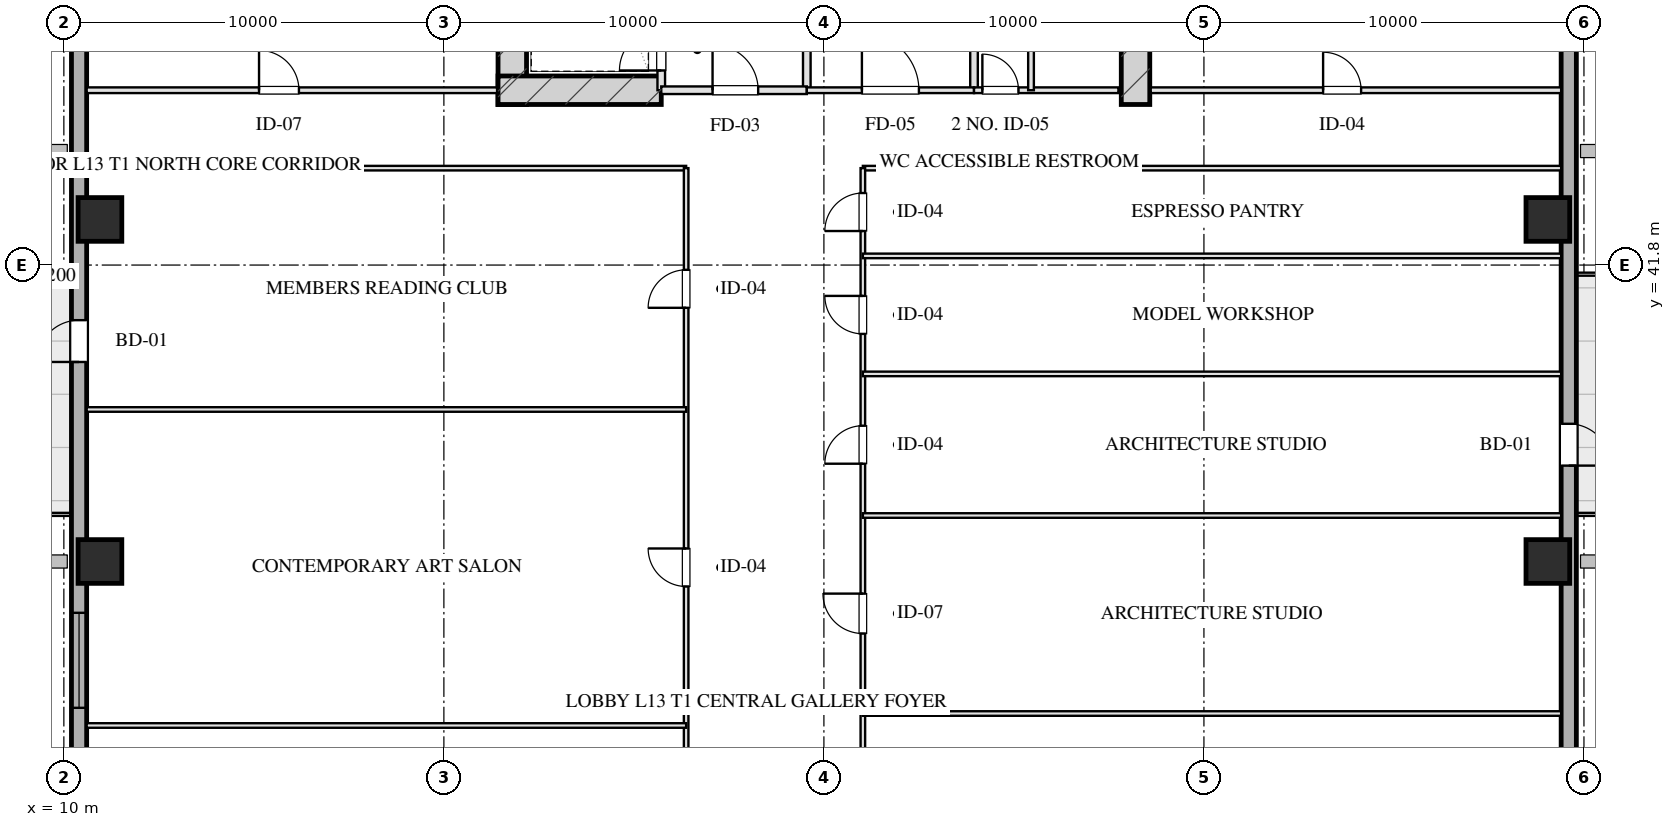
"""IFC4 building model, lengths in metres.
Left out: names, types, materials, properties, quantities, classifications, styles, units other than length and angle.
Written with IfcOpenShell. Run it as: python <this file> out.ifc"""

import sys

from ifc_helpers import new_model, si_unit, direction, frame, frame_2d, origin, origin_2d, place, context, subcontext, project, spatial, rectangle, hollow_rectangle, extrude, element, fill, save


model = new_model("IFC4")
c1 = context("Model", 3, precision=1e-05, world=origin(), true_north=direction((0.0, 1.0)))
c2 = subcontext(c1, "Body", "Model", "MODEL_VIEW")
j1 = project(units=[si_unit("LENGTHUNIT", "METRE"), si_unit("PLANEANGLEUNIT", "RADIAN")], contexts=[c1])
p1 = place(None, origin())
s1 = spatial("IfcSite", under=j1, at=p1, CompositionType="ELEMENT")
p2 = place(p1, origin())
s2 = spatial("IfcBuilding", under=s1, at=p2, CompositionType="ELEMENT")
p3 = place(p2, frame((0.0, 0.0, 57.5)))
s3 = spatial("IfcBuildingStorey", under=s2, at=p3, CompositionType="ELEMENT", Elevation=57.5)
for number, where, z_axis, x_axis in (
    (1, (21.8, 46.025, 0.0), (0.0, 0.0, 1.0), (0.0, 1.0, 0.0)),
    (2, (38.2, 46.025, 0.0), (0.0, 0.0, 1.0), (0.0, 1.0, 0.0)),
):
    element("IfcWall", number, at=place(p3, frame(where, z_axis=z_axis, x_axis=x_axis)), inside=s3, PredefinedType="SHEAR", context=c2, shape_type="SweptSolid", body=[
        extrude(rectangle(XDim=9.63, YDim=0.75, at=frame_2d((4.815, 0.0))), origin(), (0.0, 0.0, 1.0), 3.45),
    ])
p4 = place(p3, frame((21.425, 46.4, 0.0), z_axis=(0.0, 0.0, 1.0), x_axis=(1.0, 0.0, 0.0)))
e3 = element("IfcWall", 3, at=p4, inside=s3, PredefinedType="SHEAR", context=c2, shape_type="SweptSolid", body=[
    extrude(rectangle(XDim=4.295, YDim=0.75, at=frame_2d((2.147, 0.0))), origin(), (0.0, 0.0, 1.0), 3.45),
])
for number, where, z_axis, x_axis in (
    (4, (10.95, 34.0, 0.0), (0.0, 0.0, 1.0), (1.0, 0.0, 0.0)),
    (5, (10.95, 43.0, 0.0), (0.0, 0.0, 1.0), (1.0, 0.0, 0.0)),
    (6, (49.05, 34.0, 0.0), (0.0, 0.0, 1.0), (1.0, 0.0, 0.0)),
    (7, (49.05, 43.0, 0.0), (0.0, 0.0, 1.0), (1.0, 0.0, 0.0)),
):
    element("IfcColumn", number, at=place(p3, frame(where, z_axis=z_axis, x_axis=x_axis)), inside=s3, PredefinedType="COLUMN", context=c2, shape_type="SweptSolid", body=[
        extrude(hollow_rectangle(XDim=1.15, YDim=1.15, WallThickness=0.04, at=origin_2d()), origin(), (0.0, 0.0, 1.0), 3.451),
    ])
p5 = place(p3, frame((10.4, 7.2, 0.0), z_axis=(0.0, 0.0, 1.0), x_axis=(0.0, 1.0, 0.0)))
e8 = element("IfcWall", 8, at=p5, inside=s3, PredefinedType="SOLIDWALL", context=c2, shape_type="SweptSolid", body=[
    extrude(rectangle(XDim=53.6, YDim=0.4, at=frame_2d((26.8, 0.0))), origin(), (0.0, 0.0, 1.0), 2.61),
])
p6 = place(p5, frame((19.15, 0.0, 0.75)))
e9 = element("IfcOpeningElement", 9, at=p6, cuts=e8, PredefinedType="OPENING", context=c2, shape_type="SweptSolid", body=[
    extrude(rectangle(XDim=2.5, YDim=1.46, at=frame_2d((1.25, 0.73))), frame((0.0, 0.21, 0.0), z_axis=(0.0, -1.0, 0.0), x_axis=(1.0, 0.0, 0.0)), (0.0, 0.0, 1.0), 0.42),
])
p7 = place(p5, frame((22.95, 0.0, 0.75)))
e10 = element("IfcOpeningElement", 10, at=p7, cuts=e8, PredefinedType="OPENING", context=c2, shape_type="SweptSolid", body=[
    extrude(rectangle(XDim=2.5, YDim=1.46, at=frame_2d((1.25, 0.73))), frame((0.0, 0.21, 0.0), z_axis=(0.0, -1.0, 0.0), x_axis=(1.0, 0.0, 0.0)), (0.0, 0.0, 1.0), 0.42),
])
p8 = place(p5, frame((32.05, 0.0, 0.0)))
e11 = element("IfcOpeningElement", 11, at=p8, cuts=e8, PredefinedType="OPENING", context=c2, shape_type="SweptSolid", body=[
    extrude(rectangle(XDim=1.1, YDim=2.15, at=frame_2d((0.55, 1.075))), frame((0.0, 0.21, 0.0), z_axis=(0.0, -1.0, 0.0), x_axis=(1.0, 0.0, 0.0)), (0.0, 0.0, 1.0), 0.42),
])
p9 = place(p3, frame((49.6, 60.8, 0.0), z_axis=(0.0, 0.0, 1.0), x_axis=(0.0, -1.0, 0.0)))
e12 = element("IfcWall", 12, at=p9, inside=s3, PredefinedType="SOLIDWALL", context=c2, shape_type="SweptSolid", body=[
    extrude(rectangle(XDim=53.6, YDim=0.4, at=frame_2d((26.8, 0.0))), origin(), (0.0, 0.0, 1.0), 2.61),
])
p10 = place(p9, frame((23.177, 0.0, 0.0)))
e13 = element("IfcOpeningElement", 13, at=p10, cuts=e12, PredefinedType="OPENING", context=c2, shape_type="SweptSolid", body=[
    extrude(rectangle(XDim=1.1, YDim=2.15, at=frame_2d((0.55, 1.075))), frame((0.0, 0.21, 0.0), z_axis=(0.0, -1.0, 0.0), x_axis=(1.0, 0.0, 0.0)), (0.0, 0.0, 1.0), 0.42),
])
p11 = place(p3, frame((25.72, 46.4, 0.0), z_axis=(0.0, 0.0, 1.0), x_axis=(0.0, 1.0, 0.0)))
e14 = element("IfcWall", 14, at=p11, inside=s3, PredefinedType="PARTITIONING", context=c2, shape_type="SweptSolid", body=[
    extrude(rectangle(XDim=1.9, YDim=0.2, at=frame_2d((0.95, 0.0))), origin(), (0.0, 0.0, 1.0), 3.175),
])
p12 = place(p11, frame((0.52, 0.0, 0.0)))
e15 = element("IfcOpeningElement", 15, at=p12, cuts=e14, PredefinedType="OPENING", context=c2, shape_type="SweptSolid", body=[
    extrude(rectangle(XDim=1.1, YDim=2.05, at=frame_2d((0.55, 1.025))), frame((0.0, 0.11, 0.0), z_axis=(0.0, -1.0, 0.0), x_axis=(1.0, 0.0, 0.0)), (0.0, 0.0, 1.0), 0.22),
])
p13 = place(p3, frame((29.55, 46.4, 0.0), z_axis=(0.0, 0.0, 1.0), x_axis=(0.0, 1.0, 0.0)))
e16 = element("IfcWall", 16, at=p13, inside=s3, PredefinedType="PARTITIONING", context=c2, shape_type="SweptSolid", body=[
    extrude(rectangle(XDim=8.43, YDim=0.2, at=frame_2d((4.215, 0.0))), origin(), (0.0, 0.0, 1.0), 3.175),
])
p14 = place(p3, frame((25.72, 46.4, 0.0), z_axis=(0.0, 0.0, 1.0), x_axis=(1.0, 0.0, 0.0)))
e17 = element("IfcWall", 17, at=p14, inside=s3, PredefinedType="PARTITIONING", context=c2, shape_type="SweptSolid", body=[
    extrude(rectangle(XDim=3.83, YDim=0.2, at=frame_2d((1.915, 0.0))), origin(), (0.0, 0.0, 1.0), 3.175),
])
p15 = place(p14, frame((1.35, 0.0, 0.0)))
e18 = element("IfcOpeningElement", 18, at=p15, cuts=e17, PredefinedType="OPENING", context=c2, shape_type="SweptSolid", body=[
    extrude(rectangle(XDim=1.2, YDim=2.05, at=frame_2d((0.6, 1.025))), frame((0.0, 0.11, 0.0), z_axis=(0.0, -1.0, 0.0), x_axis=(1.0, 0.0, 0.0)), (0.0, 0.0, 1.0), 0.22),
])
p16 = place(p3, frame((33.95, 46.4, 0.0), z_axis=(0.0, 0.0, 1.0), x_axis=(0.0, 1.0, 0.0)))
e19 = element("IfcWall", 19, at=p16, inside=s3, PredefinedType="PARTITIONING", context=c2, shape_type="SweptSolid", body=[
    extrude(rectangle(XDim=8.43, YDim=0.2, at=frame_2d((4.215, 0.0))), origin(), (0.0, 0.0, 1.0), 3.175),
])
p17 = place(p3, frame((29.55, 46.4, 0.0), z_axis=(0.0, 0.0, 1.0), x_axis=(1.0, 0.0, 0.0)))
e20 = element("IfcWall", 20, at=p17, inside=s3, PredefinedType="PARTITIONING", context=c2, shape_type="SweptSolid", body=[
    extrude(rectangle(XDim=4.4, YDim=0.15, at=frame_2d((2.2, 0.0))), origin(), (0.0, 0.0, 1.0), 3.175),
])
p18 = place(p17, frame((1.45, 0.0, 0.0)))
e21 = element("IfcOpeningElement", 21, at=p18, cuts=e20, PredefinedType="OPENING", context=c2, shape_type="SweptSolid", body=[
    extrude(rectangle(XDim=1.5, YDim=2.05, at=frame_2d((0.75, 1.025))), frame((0.0, 0.085, 0.0), z_axis=(0.0, -1.0, 0.0), x_axis=(1.0, 0.0, 0.0)), (0.0, 0.0, 1.0), 0.17),
])
p19 = place(p3, frame((33.95, 46.4, 0.0), z_axis=(0.0, 0.0, 1.0), x_axis=(1.0, 0.0, 0.0)))
e22 = element("IfcWall", 22, at=p19, inside=s3, PredefinedType="PARTITIONING", context=c2, shape_type="SweptSolid", body=[
    extrude(rectangle(XDim=3.8, YDim=0.15, at=frame_2d((1.9, 0.0))), origin(), (0.0, 0.0, 1.0), 3.175),
])
p20 = place(p19, frame((0.22, 0.0, 0.0)))
e23 = element("IfcOpeningElement", 23, at=p20, cuts=e22, PredefinedType="OPENING", context=c2, shape_type="SweptSolid", body=[
    extrude(rectangle(XDim=0.95, YDim=2.05, at=frame_2d((0.475, 1.025))), frame((0.0, 0.085, 0.0), z_axis=(0.0, -1.0, 0.0), x_axis=(1.0, 0.0, 0.0)), (0.0, 0.0, 1.0), 0.17),
])
p21 = place(p3, frame((35.45, 46.4, 0.0), z_axis=(0.0, 0.0, 1.0), x_axis=(0.0, 1.0, 0.0)))
e24 = element("IfcWall", 24, at=p21, inside=s3, PredefinedType="PARTITIONING", context=c2, shape_type="SweptSolid", body=[
    extrude(rectangle(XDim=8.43, YDim=0.15, at=frame_2d((4.215, 0.0))), origin(), (0.0, 0.0, 1.0), 2.815),
])
p22 = place(p21, frame((2.55, 0.0, 0.0)))
e25 = element("IfcOpeningElement", 25, at=p22, cuts=e24, PredefinedType="OPENING", context=c2, shape_type="SweptSolid", body=[
    extrude(rectangle(XDim=0.95, YDim=2.05, at=frame_2d((0.475, 1.025))), frame((0.0, 0.085, 0.0), z_axis=(0.0, -1.0, 0.0), x_axis=(1.0, 0.0, 0.0)), (0.0, 0.0, 1.0), 0.17),
])
p23 = place(p21, frame((5.8, 0.0, 0.0)))
e26 = element("IfcOpeningElement", 26, at=p23, cuts=e24, PredefinedType="OPENING", context=c2, shape_type="SweptSolid", body=[
    extrude(rectangle(XDim=0.9, YDim=2.05, at=frame_2d((0.45, 1.025))), frame((0.0, 0.085, 0.0), z_axis=(0.0, -1.0, 0.0), x_axis=(1.0, 0.0, 0.0)), (0.0, 0.0, 1.0), 0.17),
])
p24 = place(p3, frame((10.6, 46.4, 0.0), z_axis=(0.0, 0.0, 1.0), x_axis=(1.0, 0.0, 0.0)))
e27 = element("IfcWall", 27, at=p24, inside=s3, PredefinedType="PARTITIONING", context=c2, shape_type="SweptSolid", body=[
    extrude(rectangle(XDim=10.8, YDim=0.15, at=frame_2d((5.4, 0.0))), origin(), (0.0, 0.0, 1.0), 3.175),
])
p25 = place(p24, frame((4.536, 0.0, 0.0)))
e28 = element("IfcOpeningElement", 28, at=p25, cuts=e27, PredefinedType="OPENING", context=c2, shape_type="SweptSolid", body=[
    extrude(rectangle(XDim=1.05, YDim=2.05, at=frame_2d((0.525, 1.025))), frame((0.0, 0.085, 0.0), z_axis=(0.0, -1.0, 0.0), x_axis=(1.0, 0.0, 0.0)), (0.0, 0.0, 1.0), 0.17),
])
p26 = place(p3, frame((38.6, 46.4, 0.0), z_axis=(0.0, 0.0, 1.0), x_axis=(1.0, 0.0, 0.0)))
e29 = element("IfcWall", 29, at=p26, inside=s3, PredefinedType="PARTITIONING", context=c2, shape_type="SweptSolid", body=[
    extrude(rectangle(XDim=10.8, YDim=0.15, at=frame_2d((5.4, 0.0))), origin(), (0.0, 0.0, 1.0), 3.175),
])
p27 = place(p26, frame((4.536, 0.0, 0.0)))
e30 = element("IfcOpeningElement", 30, at=p27, cuts=e29, PredefinedType="OPENING", context=c2, shape_type="SweptSolid", body=[
    extrude(rectangle(XDim=1.0, YDim=2.05, at=frame_2d((0.5, 1.025))), frame((0.0, 0.085, 0.0), z_axis=(0.0, -1.0, 0.0), x_axis=(1.0, 0.0, 0.0)), (0.0, 0.0, 1.0), 0.17),
])
p28 = place(p3, frame((10.6, 44.35, 0.0), z_axis=(0.0, 0.0, 1.0), x_axis=(1.0, 0.0, 0.0)))
e31 = element("IfcWall", 31, at=p28, inside=s3, PredefinedType="PARTITIONING", context=c2, shape_type="SweptSolid", body=[
    extrude(rectangle(XDim=15.775, YDim=0.12, at=frame_2d((7.887, 0.0))), origin(), (0.0, 0.0, 1.0), 3.175),
])
p29 = place(p3, frame((31.025, 44.35, 0.0), z_axis=(0.0, 0.0, 1.0), x_axis=(1.0, 0.0, 0.0)))
e32 = element("IfcWall", 32, at=p29, inside=s3, PredefinedType="PARTITIONING", context=c2, shape_type="SweptSolid", body=[
    extrude(rectangle(XDim=18.375, YDim=0.12, at=frame_2d((9.188, 0.0))), origin(), (0.0, 0.0, 1.0), 3.175),
])
p30 = place(p3, frame((26.375, 23.65, 0.0), z_axis=(0.0, 0.0, 1.0), x_axis=(0.0, 1.0, 0.0)))
e33 = element("IfcWall", 33, at=p30, inside=s3, PredefinedType="PARTITIONING", context=c2, shape_type="SweptSolid", body=[
    extrude(rectangle(XDim=20.7, YDim=0.12, at=frame_2d((10.35, 0.0))), origin(), (0.0, 0.0, 1.0), 3.175),
])
p31 = place(p30, frame((2.518, 0.0, 0.0)))
e34 = element("IfcOpeningElement", 34, at=p31, cuts=e33, PredefinedType="OPENING", context=c2, shape_type="SweptSolid", body=[
    extrude(rectangle(XDim=1.0, YDim=2.05, at=frame_2d((0.5, 1.025))), frame((0.0, 0.07, 0.0), z_axis=(0.0, -1.0, 0.0), x_axis=(1.0, 0.0, 0.0)), (0.0, 0.0, 1.0), 0.14),
])
p32 = place(p30, frame((9.692, 0.0, 0.0)))
e35 = element("IfcOpeningElement", 35, at=p32, cuts=e33, PredefinedType="OPENING", context=c2, shape_type="SweptSolid", body=[
    extrude(rectangle(XDim=1.0, YDim=2.05, at=frame_2d((0.5, 1.025))), frame((0.0, 0.07, 0.0), z_axis=(0.0, -1.0, 0.0), x_axis=(1.0, 0.0, 0.0)), (0.0, 0.0, 1.0), 0.14),
])
p33 = place(p30, frame((17.025, 0.0, 0.0)))
e36 = element("IfcOpeningElement", 36, at=p33, cuts=e33, PredefinedType="OPENING", context=c2, shape_type="SweptSolid", body=[
    extrude(rectangle(XDim=1.0, YDim=2.05, at=frame_2d((0.5, 1.025))), frame((0.0, 0.07, 0.0), z_axis=(0.0, -1.0, 0.0), x_axis=(1.0, 0.0, 0.0)), (0.0, 0.0, 1.0), 0.14),
])
p34 = place(p3, frame((31.025, 23.65, 0.0), z_axis=(0.0, 0.0, 1.0), x_axis=(0.0, 1.0, 0.0)))
e37 = element("IfcWall", 37, at=p34, inside=s3, PredefinedType="PARTITIONING", context=c2, shape_type="SweptSolid", body=[
    extrude(rectangle(XDim=20.7, YDim=0.12, at=frame_2d((10.35, 0.0))), origin(), (0.0, 0.0, 1.0), 3.175),
])
p35 = place(p34, frame((0.775, 0.0, 0.0)))
e38 = element("IfcOpeningElement", 38, at=p35, cuts=e37, PredefinedType="OPENING", context=c2, shape_type="SweptSolid", body=[
    extrude(rectangle(XDim=0.85, YDim=2.05, at=frame_2d((0.425, 1.025))), frame((0.0, 0.07, 0.0), z_axis=(0.0, -1.0, 0.0), x_axis=(1.0, 0.0, 0.0)), (0.0, 0.0, 1.0), 0.14),
])
p36 = place(p34, frame((3.95, 0.0, 0.0)))
e39 = element("IfcOpeningElement", 39, at=p36, cuts=e37, PredefinedType="OPENING", context=c2, shape_type="SweptSolid", body=[
    extrude(rectangle(XDim=1.0, YDim=2.05, at=frame_2d((0.5, 1.025))), frame((0.0, 0.07, 0.0), z_axis=(0.0, -1.0, 0.0), x_axis=(1.0, 0.0, 0.0)), (0.0, 0.0, 1.0), 0.14),
])
p37 = place(p34, frame((8.455, 0.0, 0.0)))
e40 = element("IfcOpeningElement", 40, at=p37, cuts=e37, PredefinedType="OPENING", context=c2, shape_type="SweptSolid", body=[
    extrude(rectangle(XDim=1.05, YDim=2.05, at=frame_2d((0.525, 1.025))), frame((0.0, 0.07, 0.0), z_axis=(0.0, -1.0, 0.0), x_axis=(1.0, 0.0, 0.0)), (0.0, 0.0, 1.0), 0.14),
])
p38 = place(p34, frame((12.923, 0.0, 0.0)))
e41 = element("IfcOpeningElement", 41, at=p38, cuts=e37, PredefinedType="OPENING", context=c2, shape_type="SweptSolid", body=[
    extrude(rectangle(XDim=1.0, YDim=2.05, at=frame_2d((0.5, 1.025))), frame((0.0, 0.07, 0.0), z_axis=(0.0, -1.0, 0.0), x_axis=(1.0, 0.0, 0.0)), (0.0, 0.0, 1.0), 0.14),
])
p39 = place(p34, frame((16.338, 0.0, 0.0)))
e42 = element("IfcOpeningElement", 42, at=p39, cuts=e37, PredefinedType="OPENING", context=c2, shape_type="SweptSolid", body=[
    extrude(rectangle(XDim=1.0, YDim=2.05, at=frame_2d((0.5, 1.025))), frame((0.0, 0.07, 0.0), z_axis=(0.0, -1.0, 0.0), x_axis=(1.0, 0.0, 0.0)), (0.0, 0.0, 1.0), 0.14),
])
p40 = place(p34, frame((19.045, 0.0, 0.0)))
e43 = element("IfcOpeningElement", 43, at=p40, cuts=e37, PredefinedType="OPENING", context=c2, shape_type="SweptSolid", body=[
    extrude(rectangle(XDim=1.0, YDim=2.05, at=frame_2d((0.5, 1.025))), frame((0.0, 0.07, 0.0), z_axis=(0.0, -1.0, 0.0), x_axis=(1.0, 0.0, 0.0)), (0.0, 0.0, 1.0), 0.14),
])
for number, where, z_axis, x_axis in (
    (44, (10.6, 29.685, 0.0), (0.0, 0.0, 1.0), (1.0, 0.0, 0.0)),
    (45, (10.6, 38.0, 0.0), (0.0, 0.0, 1.0), (1.0, 0.0, 0.0)),
):
    element("IfcWall", number, at=place(p3, frame(where, z_axis=z_axis, x_axis=x_axis)), inside=s3, PredefinedType="PARTITIONING", context=c2, shape_type="SweptSolid", body=[
        extrude(rectangle(XDim=15.775, YDim=0.12, at=frame_2d((7.887, 0.0))), origin(), (0.0, 0.0, 1.0), 3.175),
    ])
for number, where, z_axis, x_axis in (
    (46, (31.025, 30.0, 0.0), (0.0, 0.0, 1.0), (1.0, 0.0, 0.0)),
    (47, (31.025, 35.21, 0.0), (0.0, 0.0, 1.0), (1.0, 0.0, 0.0)),
    (48, (31.025, 38.936, 0.0), (0.0, 0.0, 1.0), (1.0, 0.0, 0.0)),
    (49, (31.025, 42.041, 0.0), (0.0, 0.0, 1.0), (1.0, 0.0, 0.0)),
):
    element("IfcWall", number, at=place(p3, frame(where, z_axis=z_axis, x_axis=x_axis)), inside=s3, PredefinedType="PARTITIONING", context=c2, shape_type="SweptSolid", body=[
        extrude(rectangle(XDim=18.375, YDim=0.12, at=frame_2d((9.188, 0.0))), origin(), (0.0, 0.0, 1.0), 3.175),
    ])
p41 = place(p7, origin())
e50 = element("IfcWindow", 50, at=p41, inside=s3, PartitioningType="TRIPLE_PANEL_VERTICAL", PredefinedType="WINDOW", context=c2, shape_type="SweptSolid", body=[
    extrude(rectangle(XDim=2.5, YDim=1.46, at=frame_2d((1.25, 0.73))), frame((0.0, 0.03, 0.0), z_axis=(0.0, -1.0, 0.0), x_axis=(1.0, 0.0, 0.0)), (0.0, 0.0, 1.0), 0.06),
])
fill(e10, e50)
p42 = place(p8, origin())
e51 = element("IfcDoor", 51, at=p42, inside=s3, OperationType="SINGLE_SWING_LEFT", PredefinedType="DOOR", context=c2, shape_type="SweptSolid", body=[
    extrude(rectangle(XDim=1.1, YDim=2.15, at=frame_2d((0.55, 1.075))), frame((0.0, 0.025, 0.0), z_axis=(0.0, -1.0, 0.0), x_axis=(1.0, 0.0, 0.0)), (0.0, 0.0, 1.0), 0.05),
])
fill(e11, e51)
p43 = place(p10, origin())
e52 = element("IfcDoor", 52, at=p43, inside=s3, OperationType="SINGLE_SWING_RIGHT", PredefinedType="DOOR", context=c2, shape_type="SweptSolid", body=[
    extrude(rectangle(XDim=1.1, YDim=2.15, at=frame_2d((0.55, 1.075))), frame((0.0, 0.025, 0.0), z_axis=(0.0, -1.0, 0.0), x_axis=(1.0, 0.0, 0.0)), (0.0, 0.0, 1.0), 0.05),
])
fill(e13, e52)
p44 = place(p12, origin())
e53 = element("IfcDoor", 53, at=p44, inside=s3, OperationType="SINGLE_SWING_LEFT", PredefinedType="DOOR", context=c2, shape_type="SweptSolid", body=[
    extrude(rectangle(XDim=1.1, YDim=2.05, at=frame_2d((0.55, 1.025))), frame((0.0, 0.025, 0.0), z_axis=(0.0, -1.0, 0.0), x_axis=(1.0, 0.0, 0.0)), (0.0, 0.0, 1.0), 0.05),
])
fill(e15, e53)
p45 = place(p15, origin())
e54 = element("IfcDoor", 54, at=p45, inside=s3, OperationType="SINGLE_SWING_LEFT", PredefinedType="DOOR", context=c2, shape_type="SweptSolid", body=[
    extrude(rectangle(XDim=1.2, YDim=2.05, at=frame_2d((0.6, 1.025))), frame((0.0, 0.025, 0.0), z_axis=(0.0, -1.0, 0.0), x_axis=(1.0, 0.0, 0.0)), (0.0, 0.0, 1.0), 0.05),
])
fill(e18, e54)
p46 = place(p18, origin())
e55 = element("IfcDoor", 55, at=p46, inside=s3, OperationType="SINGLE_SWING_LEFT", PredefinedType="DOOR", context=c2, shape_type="SweptSolid", body=[
    extrude(rectangle(XDim=1.5, YDim=2.05, at=frame_2d((0.75, 1.025))), frame((0.0, 0.025, 0.0), z_axis=(0.0, -1.0, 0.0), x_axis=(1.0, 0.0, 0.0)), (0.0, 0.0, 1.0), 0.05),
])
fill(e21, e55)
p47 = place(p20, origin())
e56 = element("IfcDoor", 56, at=p47, inside=s3, OperationType="SINGLE_SWING_LEFT", PredefinedType="DOOR", context=c2, shape_type="SweptSolid", body=[
    extrude(rectangle(XDim=0.95, YDim=2.05, at=frame_2d((0.475, 1.025))), frame((0.0, 0.025, 0.0), z_axis=(0.0, -1.0, 0.0), x_axis=(1.0, 0.0, 0.0)), (0.0, 0.0, 1.0), 0.05),
])
fill(e23, e56)
p48 = place(p25, origin())
e57 = element("IfcDoor", 57, at=p48, inside=s3, OperationType="SINGLE_SWING_LEFT", PredefinedType="DOOR", context=c2, shape_type="SweptSolid", body=[
    extrude(rectangle(XDim=1.05, YDim=2.05, at=frame_2d((0.525, 1.025))), frame((0.0, 0.025, 0.0), z_axis=(0.0, -1.0, 0.0), x_axis=(1.0, 0.0, 0.0)), (0.0, 0.0, 1.0), 0.05),
])
fill(e28, e57)
p49 = place(p27, origin())
e58 = element("IfcDoor", 58, at=p49, inside=s3, OperationType="SINGLE_SWING_LEFT", PredefinedType="DOOR", context=c2, shape_type="SweptSolid", body=[
    extrude(rectangle(XDim=1.0, YDim=2.05, at=frame_2d((0.5, 1.025))), frame((0.0, 0.025, 0.0), z_axis=(0.0, -1.0, 0.0), x_axis=(1.0, 0.0, 0.0)), (0.0, 0.0, 1.0), 0.05),
])
fill(e30, e58)
p50 = place(p32, origin())
e59 = element("IfcDoor", 59, at=p50, inside=s3, OperationType="SINGLE_SWING_RIGHT", PredefinedType="DOOR", context=c2, shape_type="SweptSolid", body=[
    extrude(rectangle(XDim=1.0, YDim=2.05, at=frame_2d((0.5, 1.025))), frame((0.0, 0.025, 0.0), z_axis=(0.0, -1.0, 0.0), x_axis=(1.0, 0.0, 0.0)), (0.0, 0.0, 1.0), 0.05),
])
fill(e35, e59)
p51 = place(p33, origin())
e60 = element("IfcDoor", 60, at=p51, inside=s3, OperationType="SINGLE_SWING_LEFT", PredefinedType="DOOR", context=c2, shape_type="SweptSolid", body=[
    extrude(rectangle(XDim=1.0, YDim=2.05, at=frame_2d((0.5, 1.025))), frame((0.0, 0.025, 0.0), z_axis=(0.0, -1.0, 0.0), x_axis=(1.0, 0.0, 0.0)), (0.0, 0.0, 1.0), 0.05),
])
fill(e36, e60)
p52 = place(p37, origin())
e61 = element("IfcDoor", 61, at=p52, inside=s3, OperationType="SINGLE_SWING_RIGHT", PredefinedType="DOOR", context=c2, shape_type="SweptSolid", body=[
    extrude(rectangle(XDim=1.05, YDim=2.05, at=frame_2d((0.525, 1.025))), frame((0.0, 0.025, 0.0), z_axis=(0.0, -1.0, 0.0), x_axis=(1.0, 0.0, 0.0)), (0.0, 0.0, 1.0), 0.05),
])
fill(e40, e61)
p53 = place(p38, origin())
e62 = element("IfcDoor", 62, at=p53, inside=s3, OperationType="SINGLE_SWING_LEFT", PredefinedType="DOOR", context=c2, shape_type="SweptSolid", body=[
    extrude(rectangle(XDim=1.0, YDim=2.05, at=frame_2d((0.5, 1.025))), frame((0.0, 0.025, 0.0), z_axis=(0.0, -1.0, 0.0), x_axis=(1.0, 0.0, 0.0)), (0.0, 0.0, 1.0), 0.05),
])
fill(e41, e62)
p54 = place(p39, origin())
e63 = element("IfcDoor", 63, at=p54, inside=s3, OperationType="SINGLE_SWING_RIGHT", PredefinedType="DOOR", context=c2, shape_type="SweptSolid", body=[
    extrude(rectangle(XDim=1.0, YDim=2.05, at=frame_2d((0.5, 1.025))), frame((0.0, 0.025, 0.0), z_axis=(0.0, -1.0, 0.0), x_axis=(1.0, 0.0, 0.0)), (0.0, 0.0, 1.0), 0.05),
])
fill(e42, e63)
p55 = place(p40, origin())
e64 = element("IfcDoor", 64, at=p55, inside=s3, OperationType="SINGLE_SWING_LEFT", PredefinedType="DOOR", context=c2, shape_type="SweptSolid", body=[
    extrude(rectangle(XDim=1.0, YDim=2.05, at=frame_2d((0.5, 1.025))), frame((0.0, 0.025, 0.0), z_axis=(0.0, -1.0, 0.0), x_axis=(1.0, 0.0, 0.0)), (0.0, 0.0, 1.0), 0.05),
])
fill(e43, e64)
save(model, sys.argv[1])
